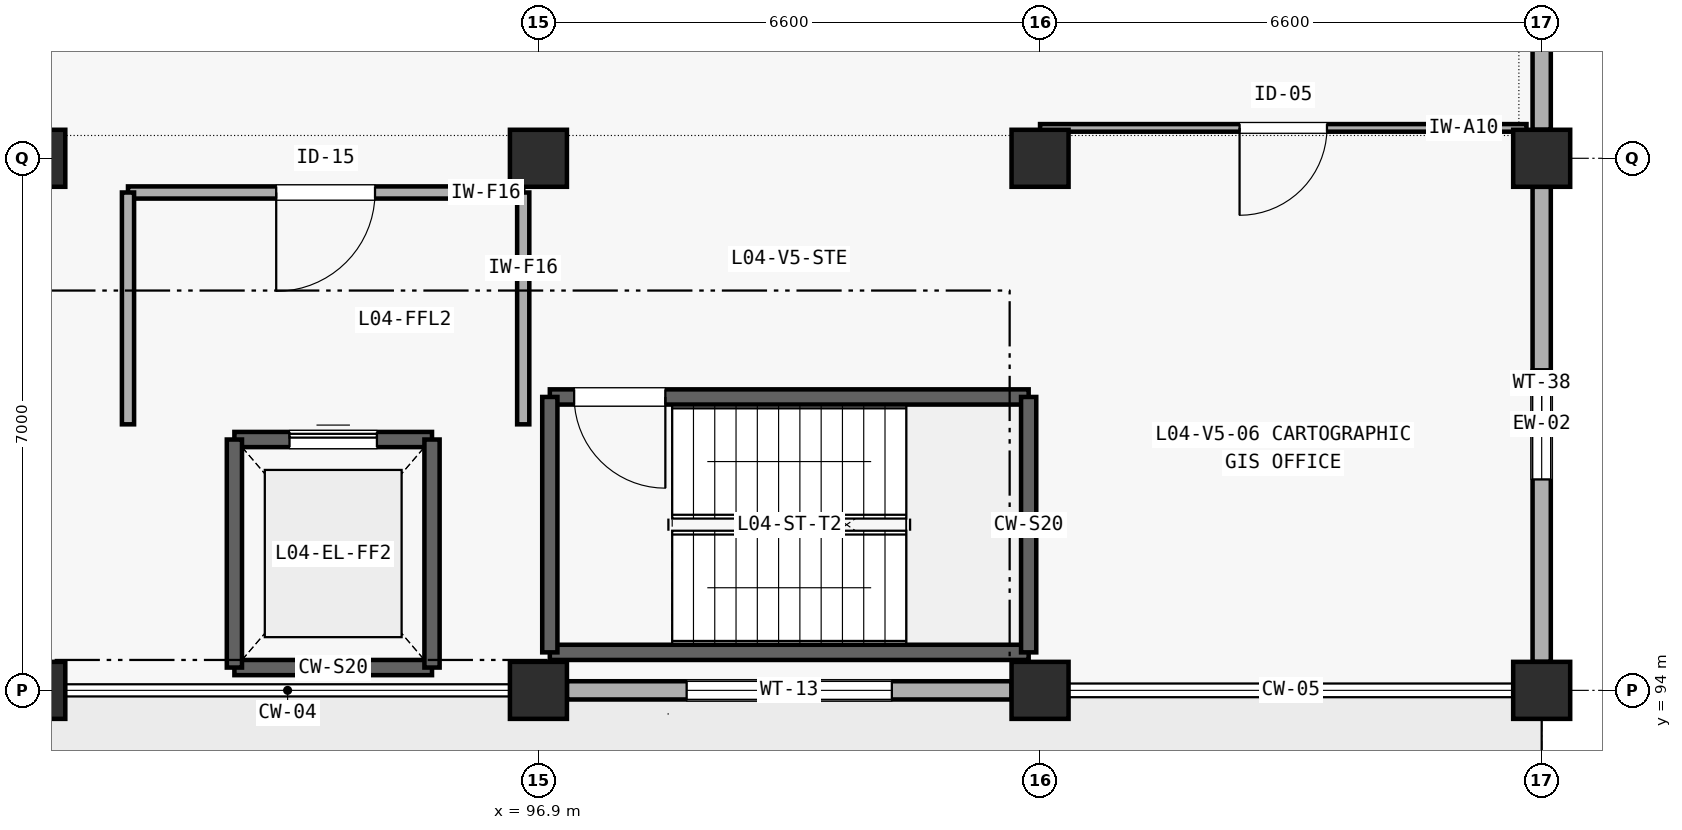
"""IFC4 building model, lengths in metres.
Left out: names, types, materials, properties, quantities, classifications, styles, units other than length and angle.
Written with IfcOpenShell. Run it as: python <this file> out.ifc"""

import sys

from ifc_helpers import new_model, si_unit, direction, frame, frame_2d, origin, origin_2d, place, context, subcontext, project, spatial, rectangle, extrude, element, fill, save


model = new_model("IFC4")
c1 = context("Model", 3, precision=1e-05, world=origin(), true_north=direction((0.0, 1.0)))
c2 = subcontext(c1, "Body", "Model", "MODEL_VIEW")
j1 = project(units=[si_unit("LENGTHUNIT", "METRE"), si_unit("PLANEANGLEUNIT", "RADIAN")], contexts=[c1])
p1 = place(None, origin())
s1 = spatial("IfcSite", under=j1, at=p1, CompositionType="ELEMENT")
p2 = place(p1, origin())
s2 = spatial("IfcBuilding", under=s1, at=p2, CompositionType="ELEMENT")
p3 = place(p2, frame((0.0, 0.0, 16.8)))
s3 = spatial("IfcBuildingStorey", under=s2, at=p3, CompositionType="ELEMENT", Elevation=16.8)
for number, where, z_axis, x_axis in (
    (1, (90.3, 94.0, 0.0), (0.0, 0.0, 1.0), (1.0, 0.0, 0.0)),
    (2, (90.3, 101.0, 0.0), (0.0, 0.0, 1.0), (1.0, 0.0, 0.0)),
    (3, (96.9, 94.0, 0.0), (0.0, 0.0, 1.0), (1.0, 0.0, 0.0)),
    (4, (96.9, 101.0, 0.0), (0.0, 0.0, 1.0), (1.0, 0.0, 0.0)),
    (5, (103.5, 94.0, 0.0), (0.0, 0.0, 1.0), (1.0, 0.0, 0.0)),
    (6, (103.5, 101.0, 0.0), (0.0, 0.0, 1.0), (1.0, 0.0, 0.0)),
    (7, (110.1, 94.0, 0.0), (0.0, 0.0, 1.0), (1.0, 0.0, 0.0)),
    (8, (110.1, 101.0, 0.0), (0.0, 0.0, 1.0), (1.0, 0.0, 0.0)),
):
    element("IfcColumn", number, at=place(p3, frame(where, z_axis=z_axis, x_axis=x_axis)), inside=s3, PredefinedType="COLUMN", context=c2, shape_type="SweptSolid", body=[
        extrude(rectangle(XDim=0.75, YDim=0.75, at=origin_2d()), origin(), (0.0, 0.0, 1.0), 4.2),
    ])
p4 = place(p3, frame((97.275, 94.0, 0.0), z_axis=(0.0, 0.0, 1.0), x_axis=(1.0, 0.0, 0.0)))
e9 = element("IfcWall", 9, at=p4, inside=s3, PredefinedType="SOLIDWALL", context=c2, shape_type="SweptSolid", body=[
    extrude(rectangle(XDim=5.85, YDim=0.24, at=frame_2d((2.925, 0.0))), origin(), (0.0, 0.0, 1.0), 3.135),
])
p5 = place(p4, frame((1.575, 0.0, 0.85)))
e10 = element("IfcOpeningElement", 10, at=p5, cuts=e9, PredefinedType="OPENING", context=c2, shape_type="SweptSolid", body=[
    extrude(rectangle(XDim=2.7, YDim=1.5, at=frame_2d((1.35, 0.75))), frame((0.0, 0.13, 0.0), z_axis=(0.0, -1.0, 0.0), x_axis=(1.0, 0.0, 0.0)), (0.0, 0.0, 1.0), 0.26),
])
p6 = place(p3, frame((110.1, 94.375, 0.0), z_axis=(0.0, 0.0, 1.0), x_axis=(0.0, 1.0, 0.0)))
e11 = element("IfcWall", 11, at=p6, inside=s3, PredefinedType="SOLIDWALL", context=c2, shape_type="SweptSolid", body=[
    extrude(rectangle(XDim=6.25, YDim=0.24, at=frame_2d((3.125, 0.0))), origin(), (0.0, 0.0, 1.0), 3.505),
])
p7 = place(p6, frame((2.4, 0.0, 0.85)))
e12 = element("IfcOpeningElement", 12, at=p7, cuts=e11, PredefinedType="OPENING", context=c2, shape_type="SweptSolid", body=[
    extrude(rectangle(XDim=1.45, YDim=1.55, at=frame_2d((0.725, 0.775))), frame((0.0, 0.13, 0.0), z_axis=(0.0, -1.0, 0.0), x_axis=(1.0, 0.0, 0.0)), (0.0, 0.0, 1.0), 0.26),
])
p8 = place(p3, frame((110.1, 101.375, 0.0), z_axis=(0.0, 0.0, 1.0), x_axis=(0.0, 1.0, 0.0)))
e13 = element("IfcWall", 13, at=p8, inside=s3, PredefinedType="SOLIDWALL", context=c2, shape_type="SweptSolid", body=[
    extrude(rectangle(XDim=6.25, YDim=0.24, at=frame_2d((3.125, 0.0))), origin(), (0.0, 0.0, 1.0), 3.505),
])
p9 = place(p8, frame((2.1, 0.0, 0.85)))
e14 = element("IfcOpeningElement", 14, at=p9, cuts=e13, PredefinedType="OPENING", context=c2, shape_type="SweptSolid", body=[
    extrude(rectangle(XDim=2.05, YDim=1.55, at=frame_2d((1.025, 0.775))), frame((0.0, 0.13, 0.0), z_axis=(0.0, -1.0, 0.0), x_axis=(1.0, 0.0, 0.0)), (0.0, 0.0, 1.0), 0.26),
])
p10 = place(p3, frame((97.05, 94.5, 0.0), z_axis=(0.0, 0.0, 1.0), x_axis=(1.0, 0.0, 0.0)))
e15 = element("IfcWall", 15, at=p10, inside=s3, PredefinedType="SHEAR", context=c2, shape_type="SweptSolid", body=[
    extrude(rectangle(XDim=6.3, YDim=0.2, at=frame_2d((3.15, 0.0))), origin(), (0.0, 0.0, 1.0), 4.2),
])
p11 = place(p3, frame((97.05, 97.86, 0.0), z_axis=(0.0, 0.0, 1.0), x_axis=(1.0, 0.0, 0.0)))
e16 = element("IfcWall", 16, at=p11, inside=s3, PredefinedType="SHEAR", context=c2, shape_type="SweptSolid", body=[
    extrude(rectangle(XDim=6.3, YDim=0.2, at=frame_2d((3.15, 0.0))), origin(), (0.0, 0.0, 1.0), 4.2),
])
p12 = place(p11, frame((0.32, 0.0, 0.0)))
e17 = element("IfcOpeningElement", 17, at=p12, cuts=e16, PredefinedType="OPENING", context=c2, shape_type="SweptSolid", body=[
    extrude(rectangle(XDim=1.2, YDim=2.15, at=frame_2d((0.6, 1.075))), frame((0.0, 0.11, 0.0), z_axis=(0.0, -1.0, 0.0), x_axis=(1.0, 0.0, 0.0)), (0.0, 0.0, 1.0), 0.22),
])
for number, where, z_axis, x_axis in (
    (18, (97.05, 94.5, 0.0), (0.0, 0.0, 1.0), (0.0, 1.0, 0.0)),
    (19, (103.35, 94.5, 0.0), (0.0, 0.0, 1.0), (0.0, 1.0, 0.0)),
):
    element("IfcWall", number, at=place(p3, frame(where, z_axis=z_axis, x_axis=x_axis)), inside=s3, PredefinedType="SHEAR", context=c2, shape_type="SweptSolid", body=[
        extrude(rectangle(XDim=3.36, YDim=0.2, at=frame_2d((1.68, 0.0))), origin(), (0.0, 0.0, 1.0), 4.2),
    ])
p13 = place(p3, frame((92.9, 94.3, 0.0), z_axis=(0.0, 0.0, 1.0), x_axis=(1.0, 0.0, 0.0)))
e20 = element("IfcWall", 20, at=p13, inside=s3, PredefinedType="SHEAR", context=c2, shape_type="SweptSolid", body=[
    extrude(rectangle(XDim=2.6, YDim=0.2, at=frame_2d((1.3, 0.0))), origin(), (0.0, 0.0, 1.0), 4.2),
])
p14 = place(p3, frame((92.9, 97.3, 0.0), z_axis=(0.0, 0.0, 1.0), x_axis=(1.0, 0.0, 0.0)))
e21 = element("IfcWall", 21, at=p14, inside=s3, PredefinedType="SHEAR", context=c2, shape_type="SweptSolid", body=[
    extrude(rectangle(XDim=2.6, YDim=0.2, at=frame_2d((1.3, 0.0))), origin(), (0.0, 0.0, 1.0), 4.2),
])
p15 = place(p14, frame((0.725, 0.0, 0.0)))
e22 = element("IfcOpeningElement", 22, at=p15, cuts=e21, PredefinedType="OPENING", context=c2, shape_type="SweptSolid", body=[
    extrude(rectangle(XDim=1.15, YDim=2.2, at=frame_2d((0.575, 1.1))), frame((0.0, 0.11, 0.0), z_axis=(0.0, -1.0, 0.0), x_axis=(1.0, 0.0, 0.0)), (0.0, 0.0, 1.0), 0.22),
])
for number, where, z_axis, x_axis in (
    (23, (92.9, 94.3, 0.0), (0.0, 0.0, 1.0), (0.0, 1.0, 0.0)),
    (24, (95.5, 94.3, 0.0), (0.0, 0.0, 1.0), (0.0, 1.0, 0.0)),
):
    element("IfcWall", number, at=place(p3, frame(where, z_axis=z_axis, x_axis=x_axis)), inside=s3, PredefinedType="SHEAR", context=c2, shape_type="SweptSolid", body=[
        extrude(rectangle(XDim=3.0, YDim=0.2, at=frame_2d((1.5, 0.0))), origin(), (0.0, 0.0, 1.0), 4.2),
    ])
p16 = place(p3, frame((91.5, 100.55, 0.0), z_axis=(0.0, 0.0, 1.0), x_axis=(1.0, 0.0, 0.0)))
e25 = element("IfcWall", 25, at=p16, inside=s3, PredefinedType="SOLIDWALL", context=c2, shape_type="SweptSolid", body=[
    extrude(rectangle(XDim=5.2, YDim=0.16, at=frame_2d((2.6, 0.0))), origin(), (0.0, 0.0, 1.0), 3.9),
])
p17 = place(p16, frame((1.95, 0.0, 0.0)))
e26 = element("IfcOpeningElement", 26, at=p17, cuts=e25, PredefinedType="OPENING", context=c2, shape_type="SweptSolid", body=[
    extrude(rectangle(XDim=1.3, YDim=2.15, at=frame_2d((0.65, 1.075))), frame((0.0, 0.09, 0.0), z_axis=(0.0, -1.0, 0.0), x_axis=(1.0, 0.0, 0.0)), (0.0, 0.0, 1.0), 0.18),
])
p18 = place(p3, frame((91.5, 97.5, 0.0), z_axis=(0.0, 0.0, 1.0), x_axis=(0.0, 1.0, 0.0)))
e27 = element("IfcWall", 27, at=p18, inside=s3, PredefinedType="SOLIDWALL", context=c2, shape_type="SweptSolid", body=[
    extrude(rectangle(XDim=3.05, YDim=0.16, at=frame_2d((1.525, 0.0))), origin(), (0.0, 0.0, 1.0), 3.9),
])
p19 = place(p3, frame((96.7, 97.5, 0.0), z_axis=(0.0, 0.0, 1.0), x_axis=(0.0, 1.0, 0.0)))
e28 = element("IfcWall", 28, at=p19, inside=s3, PredefinedType="SOLIDWALL", context=c2, shape_type="SweptSolid", body=[
    extrude(rectangle(XDim=3.05, YDim=0.16, at=frame_2d((1.525, 0.0))), origin(), (0.0, 0.0, 1.0), 3.405),
])
p20 = place(p3, frame((103.5, 101.4, 0.0), z_axis=(0.0, 0.0, 1.0), x_axis=(1.0, 0.0, 0.0)))
e29 = element("IfcWall", 29, at=p20, inside=s3, PredefinedType="PARTITIONING", context=c2, shape_type="SweptSolid", body=[
    extrude(rectangle(XDim=6.4, YDim=0.1, at=frame_2d((3.2, 0.0))), origin(), (0.0, 0.0, 1.0), 3.9),
])
p21 = place(p20, frame((2.625, 0.0, 0.0)))
e30 = element("IfcOpeningElement", 30, at=p21, cuts=e29, PredefinedType="OPENING", context=c2, shape_type="SweptSolid", body=[
    extrude(rectangle(XDim=1.15, YDim=2.15, at=frame_2d((0.575, 1.075))), frame((0.0, 0.06, 0.0), z_axis=(0.0, -1.0, 0.0), x_axis=(1.0, 0.0, 0.0)), (0.0, 0.0, 1.0), 0.12),
])
p22 = place(p5, origin())
e31 = element("IfcWindow", 31, at=p22, inside=s3, PartitioningType="SINGLE_PANEL", PredefinedType="WINDOW", context=c2, shape_type="SweptSolid", body=[
    extrude(rectangle(XDim=2.7, YDim=1.5, at=frame_2d((1.35, 0.75))), frame((0.0, 0.03, 0.0), z_axis=(0.0, -1.0, 0.0), x_axis=(1.0, 0.0, 0.0)), (0.0, 0.0, 1.0), 0.06),
])
fill(e10, e31)
p23 = place(p7, origin())
e32 = element("IfcWindow", 32, at=p23, inside=s3, PartitioningType="SINGLE_PANEL", PredefinedType="WINDOW", context=c2, shape_type="SweptSolid", body=[
    extrude(rectangle(XDim=1.45, YDim=1.55, at=frame_2d((0.725, 0.775))), frame((0.0, 0.03, 0.0), z_axis=(0.0, -1.0, 0.0), x_axis=(1.0, 0.0, 0.0)), (0.0, 0.0, 1.0), 0.06),
])
fill(e12, e32)
p24 = place(p12, frame((1.2, 0.0, 0.0), z_axis=(0.0, 0.0, 1.0), x_axis=(-1.0, 0.0, 0.0)))
e33 = element("IfcDoor", 33, at=p24, inside=s3, OperationType="SINGLE_SWING_LEFT", PredefinedType="DOOR", context=c2, shape_type="SweptSolid", body=[
    extrude(rectangle(XDim=1.2, YDim=2.15, at=frame_2d((0.6, 1.075))), frame((0.0, 0.025, 0.0), z_axis=(0.0, -1.0, 0.0), x_axis=(1.0, 0.0, 0.0)), (0.0, 0.0, 1.0), 0.05),
])
fill(e17, e33)
p25 = place(p15, origin())
e34 = element("IfcDoor", 34, at=p25, inside=s3, OperationType="SLIDING_TO_LEFT", PredefinedType="DOOR", context=c2, shape_type="SweptSolid", body=[
    extrude(rectangle(XDim=1.15, YDim=2.2, at=frame_2d((0.575, 1.1))), frame((0.0, 0.025, 0.0), z_axis=(0.0, -1.0, 0.0), x_axis=(1.0, 0.0, 0.0)), (0.0, 0.0, 1.0), 0.05),
])
fill(e22, e34)
p26 = place(p17, frame((1.3, 0.0, 0.0), z_axis=(0.0, 0.0, 1.0), x_axis=(-1.0, 0.0, 0.0)))
e35 = element("IfcDoor", 35, at=p26, inside=s3, OperationType="SINGLE_SWING_RIGHT", PredefinedType="DOOR", context=c2, shape_type="SweptSolid", body=[
    extrude(rectangle(XDim=1.3, YDim=2.15, at=frame_2d((0.65, 1.075))), frame((0.0, 0.025, 0.0), z_axis=(0.0, -1.0, 0.0), x_axis=(1.0, 0.0, 0.0)), (0.0, 0.0, 1.0), 0.05),
])
fill(e26, e35)
p27 = place(p21, frame((1.15, 0.0, 0.0), z_axis=(0.0, 0.0, 1.0), x_axis=(-1.0, 0.0, 0.0)))
e36 = element("IfcDoor", 36, at=p27, inside=s3, OperationType="SINGLE_SWING_RIGHT", PredefinedType="DOOR", context=c2, shape_type="SweptSolid", body=[
    extrude(rectangle(XDim=1.15, YDim=2.15, at=frame_2d((0.575, 1.075))), frame((0.0, 0.025, 0.0), z_axis=(0.0, -1.0, 0.0), x_axis=(1.0, 0.0, 0.0)), (0.0, 0.0, 1.0), 0.05),
])
fill(e30, e36)
save(model, sys.argv[1])
